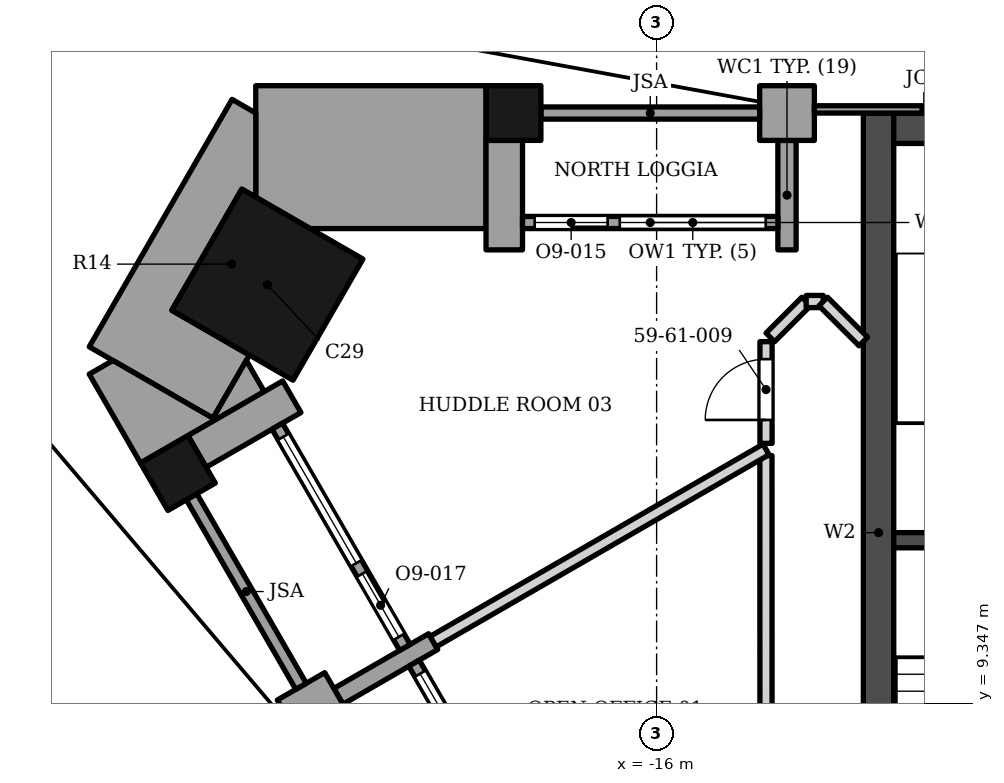
"""IFC4 building model, lengths in metres.
Left out: names, types, materials, properties, quantities, classifications, styles, units other than length and angle.
Written with IfcOpenShell. Run it as: python <this file> out.ifc"""

import sys

from ifc_helpers import new_model, si_unit, direction, frame, frame_2d, origin, origin_2d, place, context, subcontext, project, spatial, polyline, rectangle, outline, extrude, element, fill, save


model = new_model("IFC4")
c1 = context("Model", 3, precision=1e-05, world=origin(), true_north=direction((0.0, 1.0)))
c2 = subcontext(c1, "Body", "Model", "MODEL_VIEW")
j1 = project(units=[si_unit("LENGTHUNIT", "METRE"), si_unit("PLANEANGLEUNIT", "RADIAN")], contexts=[c1])
p1 = place(None, origin())
s1 = spatial("IfcSite", under=j1, at=p1, CompositionType="ELEMENT")
p2 = place(p1, origin())
s2 = spatial("IfcBuilding", under=s1, at=p2, CompositionType="ELEMENT")
p3 = place(p2, frame((0.0, 0.0, 248.2)))
s3 = spatial("IfcBuildingStorey", under=s2, at=p3, CompositionType="ELEMENT", Elevation=248.2)
p4 = place(p3, frame((-12.1, 18.802, 0.0), z_axis=(0.0, 0.0, 1.0), x_axis=(1.0, 0.0, 0.0)))
e1 = element("IfcWall", 1, at=p4, inside=s3, PredefinedType="SHEAR", context=c2, shape_type="SweptSolid", body=[
    extrude(rectangle(XDim=24.2, YDim=0.5, at=frame_2d((12.1, 0.0))), origin(), (0.0, 0.0, 1.0), 3.9),
])
p5 = place(p3, frame((-12.35, 5.253, 0.0), z_axis=(0.0, 0.0, 1.0), x_axis=(0.0, 1.0, 0.0)))
e2 = element("IfcWall", 2, at=p5, inside=s3, PredefinedType="SHEAR", context=c2, shape_type="SweptSolid", body=[
    extrude(rectangle(XDim=13.8, YDim=0.5, at=frame_2d((6.9, 0.0))), origin(), (0.0, 0.0, 1.0), 3.9),
])
p6 = place(p3, frame((-12.1, 12.028, 0.0), z_axis=(0.0, 0.0, 1.0), x_axis=(1.0, 0.0, 0.0)))
e3 = element("IfcWall", 3, at=p6, inside=s3, PredefinedType="SHEAR", context=c2, shape_type="SweptSolid", body=[
    extrude(rectangle(XDim=3.75, YDim=0.25, at=frame_2d((1.875, 0.0))), origin(), (0.0, 0.0, 1.0), 3.9),
])
p7 = place(p3, frame((-22.401, 16.23, 0.0), z_axis=(0.0, 0.0, 1.0), x_axis=(0.866025377604, -0.500000045345, 0.0)))
e4 = element("IfcColumn", 4, at=p7, inside=s3, PredefinedType="COLUMN", context=c2, shape_type="SweptSolid", body=[
    extrude(rectangle(XDim=2.3, YDim=2.3, at=origin_2d()), origin(), (0.0, 0.0, 1.0), 3.9),
])
for number, where, z_axis, x_axis in (
    (5, (-23.873, 13.132, 0.0), (0.0, 0.0, 1.0), (0.5, -0.866, 0.0)),
    (6, (-18.353, 19.053, 0.0), (0.0, 0.0, 1.0), (-1.0, 0.0, 0.0)),
):
    element("IfcColumn", number, at=place(p3, frame(where, z_axis=z_axis, x_axis=x_axis)), inside=s3, PredefinedType="COLUMN", context=c2, shape_type="SweptSolid", body=[
        extrude(rectangle(XDim=0.9, YDim=0.9, at=origin_2d()), origin(), (0.0, 0.0, 1.0), 3.9),
    ])
p8 = place(p3, frame((-23.558, 13.487, 0.0), z_axis=(0.0, 0.0, 1.0), x_axis=(0.865989075817, 0.500062916607, 0.0)))
e7 = element("IfcWall", 7, at=p8, inside=s3, PredefinedType="SOLIDWALL", context=c2, shape_type="SweptSolid", body=[
    extrude(rectangle(XDim=1.8, YDim=0.6, at=frame_2d((0.9, 0.0))), origin(), (0.0, 0.0, 1.0), 3.0),
])
p9 = place(p3, frame((-21.398, 8.845, 0.0), z_axis=(0.0, 0.0, 1.0), x_axis=(-0.50001992892, 0.866013897511, 0.0)))
e8 = element("IfcWall", 8, at=p9, inside=s3, PredefinedType="SOLIDWALL", context=c2, shape_type="SweptSolid", body=[
    extrude(rectangle(XDim=0.9, YDim=0.9, at=frame_2d((0.45, 0.0))), origin(), (0.0, 0.0, 1.0), 3.0),
])
p10 = place(p3, frame((-21.233, 9.46, 0.0), z_axis=(0.0, 0.0, 1.0), x_axis=(0.866047807691, 0.499961193289, 0.0)))
e9 = element("IfcWall", 9, at=p10, inside=s3, PredefinedType="SOLIDWALL", context=c2, shape_type="SweptSolid", body=[
    extrude(rectangle(XDim=1.8, YDim=0.3, at=frame_2d((0.9, 0.0))), origin(), (0.0, 0.0, 1.0), 3.0),
])
p11 = place(p3, frame((-23.648, 12.742, 0.0), z_axis=(0.0, 0.0, 1.0), x_axis=(0.500012057535, -0.866018442252, 0.0)))
e10 = element("IfcWall", 10, at=p11, inside=s3, PredefinedType="SOLIDWALL", context=c2, shape_type="SweptSolid", body=[
    extrude(rectangle(XDim=3.6, YDim=0.2, at=frame_2d((1.8, 0.0))), origin(), (0.0, 0.0, 1.0), 3.0),
])
p12 = place(p3, frame((-22.239, 13.902, 0.0), z_axis=(0.0, 0.0, 1.0), x_axis=(0.500027713859, -0.866009402589, 0.0)))
e11 = element("IfcWall", 11, at=p12, inside=s3, PredefinedType="ELEMENTEDWALL", context=c2, shape_type="SweptSolid", body=[
    extrude(rectangle(XDim=4.2, YDim=0.2, at=frame_2d((2.1, 0.0))), origin(), (0.0, 0.0, 1.0), 3.0),
])
p13 = place(p12, frame((0.2, 0.0, 0.45)))
e12 = element("IfcOpeningElement", 12, at=p13, cuts=e11, PredefinedType="OPENING", context=c2, shape_type="SweptSolid", body=[
    extrude(rectangle(XDim=2.4, YDim=2.25, at=frame_2d((1.2, 1.125))), frame((0.0, 0.11, 0.0), z_axis=(0.0, -1.0, 0.0), x_axis=(1.0, 0.0, 0.0)), (0.0, 0.0, 1.0), 0.22),
])
p14 = place(p12, frame((2.8, 0.0, 0.0)))
e13 = element("IfcOpeningElement", 13, at=p14, cuts=e11, PredefinedType="OPENING", context=c2, shape_type="SweptSolid", body=[
    extrude(rectangle(XDim=1.2, YDim=2.7, at=frame_2d((0.6, 1.35))), frame((0.0, 0.11, 0.0), z_axis=(0.0, -1.0, 0.0), x_axis=(1.0, 0.0, 0.0)), (0.0, 0.0, 1.0), 0.22),
])
p15 = place(p3, frame((-19.989, 10.005, 0.0), z_axis=(0.0, 0.0, 1.0), x_axis=(0.500027713859, -0.866009402589, 0.0)))
e14 = element("IfcWall", 14, at=p15, inside=s3, PredefinedType="ELEMENTEDWALL", context=c2, shape_type="SweptSolid", body=[
    extrude(rectangle(XDim=4.2, YDim=0.2, at=frame_2d((2.1, 0.0))), origin(), (0.0, 0.0, 1.0), 3.0),
])
p16 = place(p15, frame((0.2, 0.0, 0.45)))
e15 = element("IfcOpeningElement", 15, at=p16, cuts=e14, PredefinedType="OPENING", context=c2, shape_type="SweptSolid", body=[
    extrude(rectangle(XDim=3.8, YDim=2.25, at=frame_2d((1.9, 1.125))), frame((0.0, 0.11, 0.0), z_axis=(0.0, -1.0, 0.0), x_axis=(1.0, 0.0, 0.0)), (0.0, 0.0, 1.0), 0.22),
])
p17 = place(p3, origin())
e16 = element("IfcWall", 16, at=p17, inside=s3, PredefinedType="SOLIDWALL", context=c2, shape_type="SweptSolid", body=[
    extrude(outline(polyline([(-13.406, 19.502), (-14.305, 19.502), (-14.305, 18.603), (-13.406, 18.603), (-13.406, 19.502)])), origin(), (0.0, 0.0, 1.0), 3.0),
])
p18 = place(p3, origin())
e17 = element("IfcWall", 17, at=p18, inside=s3, PredefinedType="SOLIDWALL", context=c2, shape_type="SweptSolid", body=[
    extrude(outline(polyline([(-13.705, 16.802), (-13.705, 18.603), (-14.005, 18.603), (-14.005, 16.802), (-13.705, 16.802)])), origin(), (0.0, 0.0, 1.0), 3.0),
])
p19 = place(p3, origin())
e18 = element("IfcWall", 18, at=p19, inside=s3, PredefinedType="SOLIDWALL", context=c2, shape_type="SweptSolid", body=[
    extrude(outline(polyline([(-18.805, 18.603), (-18.805, 16.802), (-18.205, 16.802), (-18.205, 18.603), (-18.805, 18.603)])), origin(), (0.0, 0.0, 1.0), 3.0),
])
p20 = place(p3, origin())
e19 = element("IfcWall", 19, at=p20, inside=s3, PredefinedType="SOLIDWALL", context=c2, shape_type="SweptSolid", body=[
    extrude(outline(polyline([(-13.405, 19.173), (-13.405, 19.052), (-9.805, 19.052), (-9.805, 19.173), (-13.405, 19.173)])), origin(), (0.0, 0.0, 1.0), 3.0),
])
p21 = place(p3, origin())
e20 = element("IfcWall", 20, at=p21, inside=s3, PredefinedType="SOLIDWALL", context=c2, shape_type="SweptSolid", body=[
    extrude(outline(polyline([(-14.305, 19.153), (-17.903, 19.153), (-17.903, 18.953), (-14.305, 18.953), (-14.305, 19.153)])), origin(), (0.0, 0.0, 1.0), 3.0),
])
p22 = place(p3, frame((-14.005, 17.252, 0.0), z_axis=(0.0, 0.0, 1.0), x_axis=(-1.0, 0.0, 0.0)))
e21 = element("IfcWall", 21, at=p22, inside=s3, PredefinedType="ELEMENTEDWALL", context=c2, shape_type="SweptSolid", body=[
    extrude(rectangle(XDim=4.2, YDim=0.2, at=frame_2d((2.1, 0.0))), origin(), (0.0, 0.0, 1.0), 3.0),
])
p23 = place(p22, frame((0.2, 0.0, 0.45)))
e22 = element("IfcOpeningElement", 22, at=p23, cuts=e21, PredefinedType="OPENING", context=c2, shape_type="SweptSolid", body=[
    extrude(rectangle(XDim=2.4, YDim=2.25, at=frame_2d((1.2, 1.125))), frame((0.0, 0.11, 0.0), z_axis=(0.0, -1.0, 0.0), x_axis=(1.0, 0.0, 0.0)), (0.0, 0.0, 1.0), 0.22),
])
p24 = place(p22, frame((2.8, 0.0, 0.0)))
e23 = element("IfcOpeningElement", 23, at=p24, cuts=e21, PredefinedType="OPENING", context=c2, shape_type="SweptSolid", body=[
    extrude(rectangle(XDim=1.2, YDim=2.7, at=frame_2d((0.6, 1.35))), frame((0.0, 0.11, 0.0), z_axis=(0.0, -1.0, 0.0), x_axis=(1.0, 0.0, 0.0)), (0.0, 0.0, 1.0), 0.22),
])
p25 = place(p3, origin())
e24 = element("IfcWall", 24, at=p25, inside=s3, PredefinedType="SOLIDWALL", context=c2, shape_type="SweptSolid", body=[
    extrude(outline(polyline([(-21.699, 17.153), (-18.805, 17.153), (-18.805, 19.502), (-22.592, 19.502), (-22.592, 17.668), (-21.699, 17.153)])), origin(), (0.0, 0.0, 1.0), 3.0),
])
p26 = place(p3, origin())
e25 = element("IfcWall", 25, at=p26, inside=s3, PredefinedType="SOLIDWALL", context=c2, shape_type="SweptSolid", body=[
    extrude(outline(polyline([(-22.822, 17.801), (-22.592, 17.668), (-22.592, 19.052), (-22.982, 19.278), (-25.331, 15.208), (-23.296, 14.033), (-22.696, 15.073), (-23.972, 15.809), (-22.822, 17.801)])), origin(), (0.0, 0.0, 1.0), 3.0),
])
p27 = place(p3, origin())
e26 = element("IfcWall", 26, at=p27, inside=s3, PredefinedType="SOLIDWALL", context=c2, shape_type="SweptSolid", body=[
    extrude(outline(polyline([(-22.748, 14.983), (-23.296, 14.033), (-24.942, 14.983), (-25.331, 14.759), (-24.488, 13.297), (-22.452, 14.472), (-22.748, 14.983)])), origin(), (0.0, 0.0, 1.0), 3.0),
])
p28 = place(p3, frame((-14.202, 13.419, 0.0), z_axis=(0.0, 0.0, 1.0), x_axis=(0.000271161919, -0.999999963236, 0.0)))
e27 = element("IfcWall", 27, at=p28, inside=s3, PredefinedType="PARTITIONING", context=c2, shape_type="SweptSolid", body=[
    extrude(rectangle(XDim=5.402, YDim=0.2, at=frame_2d((2.701, 0.0))), origin(), (0.0, 0.0, 1.0), 3.73),
])
p29 = place(p3, frame((-19.674, 10.36, 0.0), z_axis=(0.0, 0.0, 1.0), x_axis=(0.866038288688, 0.499977682029, 0.0)))
e28 = element("IfcWall", 28, at=p29, inside=s3, PredefinedType="PARTITIONING", context=c2, shape_type="SweptSolid", body=[
    extrude(rectangle(XDim=6.321, YDim=0.2, at=frame_2d((3.16, 0.0))), origin(), (0.0, 0.0, 1.0), 3.128),
])
p30 = place(p3, frame((-14.2, 13.621, 0.0), z_axis=(0.0, 0.0, 1.0), x_axis=(0.0, 1.0, 0.0)))
e29 = element("IfcWall", 29, at=p30, inside=s3, PredefinedType="PARTITIONING", context=c2, shape_type="SweptSolid", body=[
    extrude(rectangle(XDim=1.672, YDim=0.2, at=frame_2d((0.836, 0.0))), origin(), (0.0, 0.0, 1.0), 3.73),
])
p31 = place(p30, frame((0.385, 0.0, 0.0)))
e30 = element("IfcOpeningElement", 30, at=p31, cuts=e29, PredefinedType="OPENING", context=c2, shape_type="SweptSolid", body=[
    extrude(rectangle(XDim=1.0, YDim=2.1, at=frame_2d((0.5, 1.05))), frame((0.0, 0.11, 0.0), z_axis=(0.0, -1.0, 0.0), x_axis=(1.0, 0.0, 0.0)), (0.0, 0.0, 1.0), 0.22),
])
p32 = place(p3, frame((-14.13, 15.364, 0.0), z_axis=(0.0, 0.0, 1.0), x_axis=(0.707106781187, 0.707106781187, 0.0)))
e31 = element("IfcWall", 31, at=p32, inside=s3, PredefinedType="PARTITIONING", context=c2, shape_type="SweptSolid", body=[
    extrude(rectangle(XDim=0.834, YDim=0.2, at=frame_2d((0.417, 0.0))), origin(), (0.0, 0.0, 1.0), 3.73),
])
p33 = place(p3, frame((-13.54, 15.953, 0.0), z_axis=(0.0, 0.0, 1.0), x_axis=(0.99999962061, -0.000871079809, 0.0)))
e32 = element("IfcWall", 32, at=p33, inside=s3, PredefinedType="PARTITIONING", context=c2, shape_type="SweptSolid", body=[
    extrude(rectangle(XDim=0.28, YDim=0.2, at=frame_2d((0.14, 0.0))), origin(), (0.0, 0.0, 1.0), 3.73),
])
p34 = place(p3, frame((-13.26, 15.953, 0.0), z_axis=(0.0, 0.0, 1.0), x_axis=(0.708285399161, -0.705926195389, 0.0)))
e33 = element("IfcWall", 33, at=p34, inside=s3, PredefinedType="PARTITIONING", context=c2, shape_type="SweptSolid", body=[
    extrude(rectangle(XDim=0.931, YDim=0.2, at=frame_2d((0.466, 0.0))), origin(), (0.0, 0.0, 1.0), 3.73),
])
p35 = place(p13, origin())
e34 = element("IfcWindow", 34, at=p35, inside=s3, PartitioningType="SINGLE_PANEL", PredefinedType="WINDOW", context=c2, shape_type="SweptSolid", body=[
    extrude(rectangle(XDim=2.4, YDim=2.25, at=frame_2d((1.2, 1.125))), frame((0.0, 0.03, 0.0), z_axis=(0.0, -1.0, 0.0), x_axis=(1.0, 0.0, 0.0)), (0.0, 0.0, 1.0), 0.06),
])
fill(e12, e34)
p36 = place(p14, origin())
e35 = element("IfcDoor", 35, at=p36, inside=s3, OperationType="SINGLE_SWING_LEFT", PredefinedType="DOOR", context=c2, shape_type="SweptSolid", body=[
    extrude(rectangle(XDim=1.2, YDim=2.7, at=frame_2d((0.6, 1.35))), frame((0.0, 0.025, 0.0), z_axis=(0.0, -1.0, 0.0), x_axis=(1.0, 0.0, 0.0)), (0.0, 0.0, 1.0), 0.05),
])
fill(e13, e35)
p37 = place(p16, origin())
e36 = element("IfcWindow", 36, at=p37, inside=s3, PartitioningType="SINGLE_PANEL", PredefinedType="WINDOW", context=c2, shape_type="SweptSolid", body=[
    extrude(rectangle(XDim=3.8, YDim=2.25, at=frame_2d((1.9, 1.125))), frame((0.0, 0.03, 0.0), z_axis=(0.0, -1.0, 0.0), x_axis=(1.0, 0.0, 0.0)), (0.0, 0.0, 1.0), 0.06),
])
fill(e15, e36)
p38 = place(p23, origin())
e37 = element("IfcWindow", 37, at=p38, inside=s3, PartitioningType="SINGLE_PANEL", PredefinedType="WINDOW", context=c2, shape_type="SweptSolid", body=[
    extrude(rectangle(XDim=2.4, YDim=2.25, at=frame_2d((1.2, 1.125))), frame((0.0, 0.03, 0.0), z_axis=(0.0, -1.0, 0.0), x_axis=(1.0, 0.0, 0.0)), (0.0, 0.0, 1.0), 0.06),
])
fill(e22, e37)
p39 = place(p24, origin())
e38 = element("IfcDoor", 38, at=p39, inside=s3, OperationType="SINGLE_SWING_LEFT", PredefinedType="DOOR", context=c2, shape_type="SweptSolid", body=[
    extrude(rectangle(XDim=1.2, YDim=2.7, at=frame_2d((0.6, 1.35))), frame((0.0, 0.025, 0.0), z_axis=(0.0, -1.0, 0.0), x_axis=(1.0, 0.0, 0.0)), (0.0, 0.0, 1.0), 0.05),
])
fill(e23, e38)
p40 = place(p31, origin())
e39 = element("IfcDoor", 39, at=p40, inside=s3, OperationType="SINGLE_SWING_LEFT", PredefinedType="DOOR", context=c2, shape_type="SweptSolid", body=[
    extrude(rectangle(XDim=1.0, YDim=2.1, at=frame_2d((0.5, 1.05))), frame((0.0, 0.025, 0.0), z_axis=(0.0, -1.0, 0.0), x_axis=(1.0, 0.0, 0.0)), (0.0, 0.0, 1.0), 0.05),
])
fill(e30, e39)
save(model, sys.argv[1])
